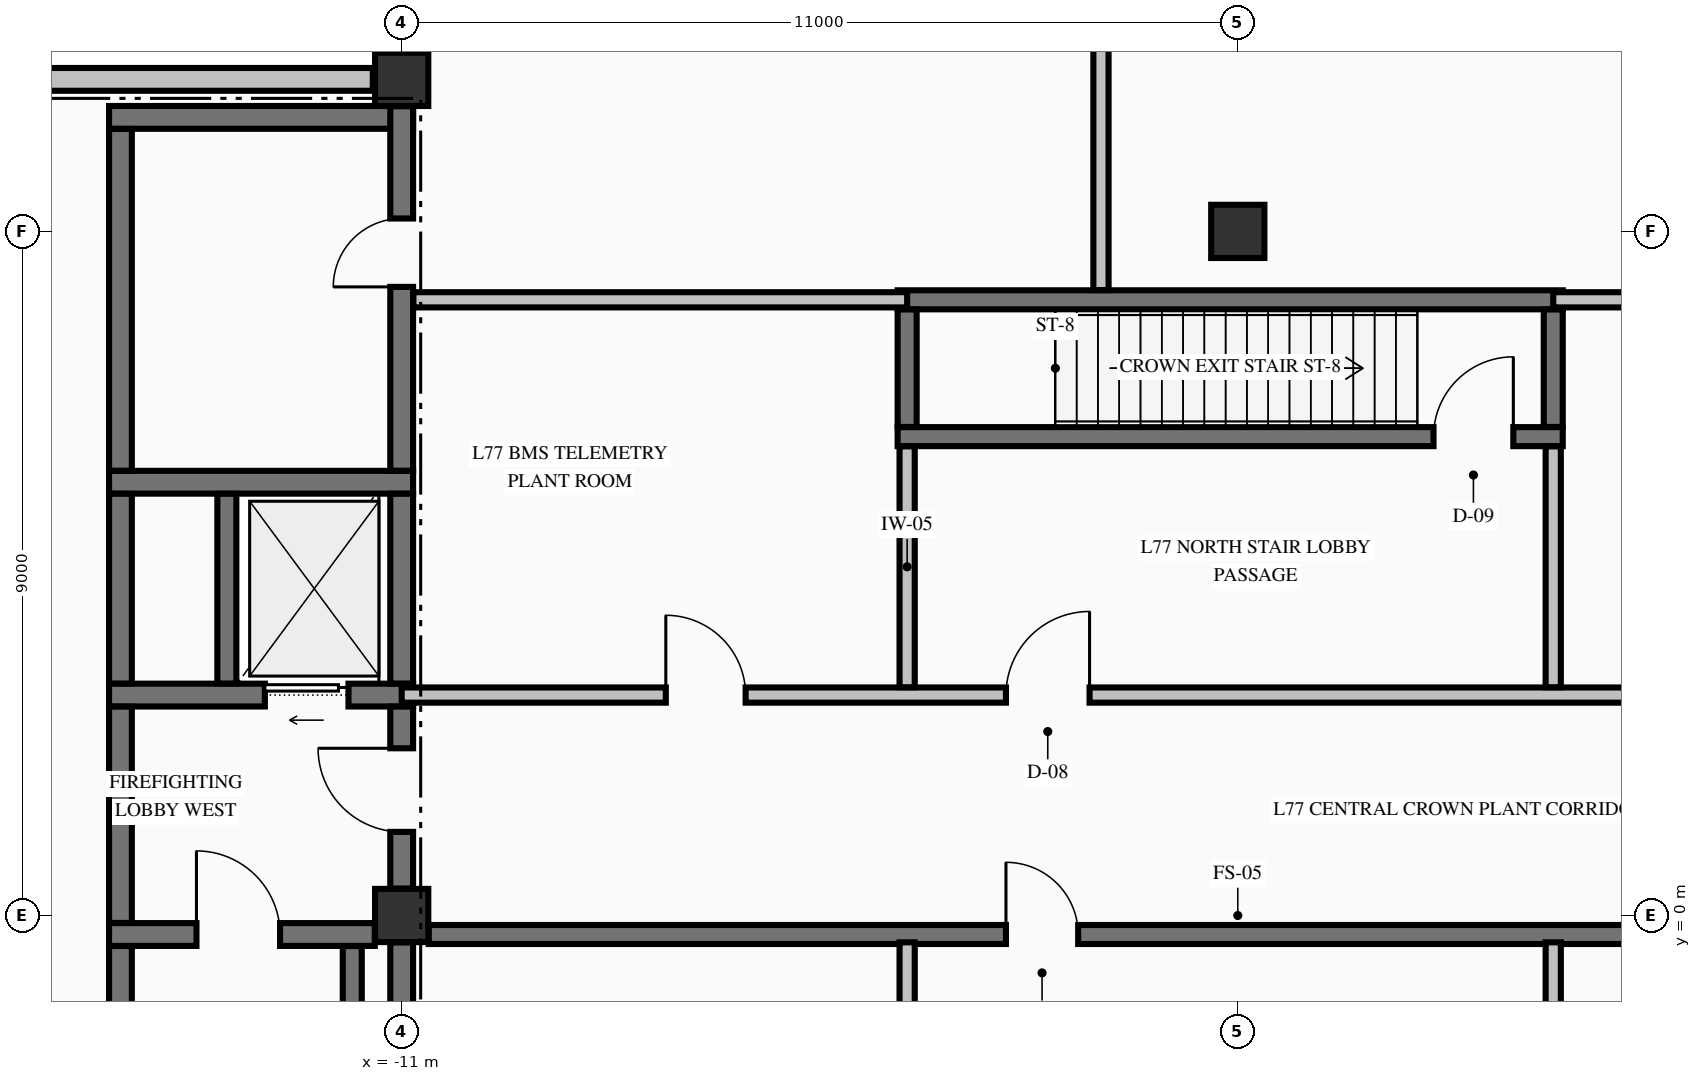
"""IFC4 building model, lengths in metres.
Left out: names, types, materials, properties, quantities, classifications, styles, units other than length and angle.
Written with IfcOpenShell. Run it as: python <this file> out.ifc"""

import sys

from ifc_helpers import new_model, si_unit, direction, frame, frame_2d, origin, origin_2d, place, context, subcontext, project, spatial, rectangle, extrude, element, fill, save


model = new_model("IFC4")
c1 = context("Model", 3, precision=1e-05, world=origin(), true_north=direction((0.0, 1.0)))
c2 = subcontext(c1, "Body", "Model", "MODEL_VIEW")
j1 = project(units=[si_unit("LENGTHUNIT", "METRE"), si_unit("PLANEANGLEUNIT", "RADIAN")], contexts=[c1])
p1 = place(None, origin())
s1 = spatial("IfcSite", under=j1, at=p1, CompositionType="ELEMENT")
p2 = place(p1, origin())
s2 = spatial("IfcBuilding", under=s1, at=p2, CompositionType="ELEMENT")
p3 = place(p2, frame((0.0, 0.0, 287.92)))
s3 = spatial("IfcBuildingStorey", under=s2, at=p3, CompositionType="ELEMENT", Elevation=287.92)
for number, where, z_axis, x_axis in (
    (1, (-11.0, 11.0, -0.325), (0.0, 0.0, 1.0), (1.0, 0.0, 0.0)),
    (2, (-11.0, 0.0, -0.325), (0.0, 0.0, 1.0), (1.0, 0.0, 0.0)),
    (3, (0.0, 9.0, -0.325), (0.0, 0.0, 1.0), (1.0, 0.0, 0.0)),
):
    element("IfcColumn", number, at=place(p3, frame(where, z_axis=z_axis, x_axis=x_axis)), inside=s3, PredefinedType="COLUMN", context=c2, shape_type="SweptSolid", body=[
        extrude(rectangle(XDim=0.7, YDim=0.7, at=origin_2d()), origin(), (0.0, 0.0, 1.0), 3.06),
    ])
p4 = place(p3, frame((-11.38, 11.0, 0.0), z_axis=(0.0, 0.0, 1.0), x_axis=(-1.0, 0.0, 0.0)))
e4 = element("IfcWall", 4, at=p4, inside=s3, PredefinedType="STANDARD", context=c2, shape_type="SweptSolid", body=[
    extrude(rectangle(XDim=5.24, YDim=0.3, at=frame_2d((2.62, 0.0))), origin(), (0.0, 0.0, 1.0), 1.077),
])
p5 = place(p3, frame((-14.85, -0.25, 0.0), z_axis=(0.0, 0.0, 1.0), x_axis=(1.0, 0.0, 0.0)))
e5 = element("IfcWall", 5, at=p5, inside=s3, PredefinedType="SHEAR", context=c2, shape_type="SweptSolid", body=[
    extrude(rectangle(XDim=3.496, YDim=0.3, at=frame_2d((1.748, 0.0))), origin(), (0.0, 0.0, 1.0), 2.735),
])
p6 = place(p5, frame((1.15, 0.0, 0.0)))
e6 = element("IfcOpeningElement", 6, at=p6, cuts=e5, PredefinedType="OPENING", context=c2, shape_type="SweptSolid", body=[
    extrude(rectangle(XDim=1.1, YDim=2.15, at=frame_2d((0.55, 1.075))), frame((0.0, 0.16, 0.0), z_axis=(0.0, -1.0, 0.0), x_axis=(1.0, 0.0, 0.0)), (0.0, 0.0, 1.0), 0.32),
])
p7 = place(p3, frame((-14.85, 2.9, 0.0), z_axis=(0.0, 0.0, 1.0), x_axis=(1.0, 0.0, 0.0)))
e7 = element("IfcWall", 7, at=p7, inside=s3, PredefinedType="SHEAR", context=c2, shape_type="SweptSolid", body=[
    extrude(rectangle(XDim=4.0, YDim=0.3, at=frame_2d((2.0, 0.0))), origin(), (0.0, 0.0, 1.0), 2.735),
])
p8 = place(p7, frame((2.05, 0.0, 0.0)))
e8 = element("IfcOpeningElement", 8, at=p8, cuts=e7, PredefinedType="OPENING", context=c2, shape_type="SweptSolid", body=[
    extrude(rectangle(XDim=1.1, YDim=2.2, at=frame_2d((0.55, 1.1))), frame((0.0, 0.16, 0.0), z_axis=(0.0, -1.0, 0.0), x_axis=(1.0, 0.0, 0.0)), (0.0, 0.0, 1.0), 0.32),
])
p9 = place(p3, frame((-14.85, 5.7, 0.0), z_axis=(0.0, 0.0, 1.0), x_axis=(1.0, 0.0, 0.0)))
e9 = element("IfcWall", 9, at=p9, inside=s3, PredefinedType="SHEAR", context=c2, shape_type="SweptSolid", body=[
    extrude(rectangle(XDim=4.0, YDim=0.3, at=frame_2d((2.0, 0.0))), origin(), (0.0, 0.0, 1.0), 2.735),
])
p10 = place(p3, frame((-4.475, 6.3, 0.0), z_axis=(0.0, 0.0, 1.0), x_axis=(1.0, 0.0, 0.0)))
e10 = element("IfcWall", 10, at=p10, inside=s3, PredefinedType="SOLIDWALL", context=c2, shape_type="SweptSolid", body=[
    extrude(rectangle(XDim=8.75, YDim=0.25, at=frame_2d((4.375, 0.0))), origin(), (0.0, 0.0, 1.0), 2.735),
])
p11 = place(p10, frame((7.05, 0.0, 0.0)))
e11 = element("IfcOpeningElement", 11, at=p11, cuts=e10, PredefinedType="OPENING", context=c2, shape_type="SweptSolid", body=[
    extrude(rectangle(XDim=1.05, YDim=2.15, at=frame_2d((0.525, 1.075))), frame((0.0, 0.135, 0.0), z_axis=(0.0, -1.0, 0.0), x_axis=(1.0, 0.0, 0.0)), (0.0, 0.0, 1.0), 0.27),
])
p12 = place(p3, frame((-4.475, 8.1, 0.0), z_axis=(0.0, 0.0, 1.0), x_axis=(1.0, 0.0, 0.0)))
e12 = element("IfcWall", 12, at=p12, inside=s3, PredefinedType="SOLIDWALL", context=c2, shape_type="SweptSolid", body=[
    extrude(rectangle(XDim=8.75, YDim=0.25, at=frame_2d((4.375, 0.0))), origin(), (0.0, 0.0, 1.0), 2.735),
])
p13 = place(p3, frame((-14.85, 10.5, 0.0), z_axis=(0.0, 0.0, 1.0), x_axis=(1.0, 0.0, 0.0)))
e13 = element("IfcWall", 13, at=p13, inside=s3, PredefinedType="SHEAR", context=c2, shape_type="SweptSolid", body=[
    extrude(rectangle(XDim=4.0, YDim=0.3, at=frame_2d((2.0, 0.0))), origin(), (0.0, 0.0, 1.0), 2.735),
])
p14 = place(p3, frame((-10.644, -0.25, 0.0), z_axis=(0.0, 0.0, 1.0), x_axis=(1.0, 0.0, 0.0)))
e14 = element("IfcWall", 14, at=p14, inside=s3, PredefinedType="SOLIDWALL", context=c2, shape_type="SweptSolid", body=[
    extrude(rectangle(XDim=21.288, YDim=0.25, at=frame_2d((10.644, 0.0))), origin(), (0.0, 0.0, 1.0), 2.735),
])
p15 = place(p14, frame((7.594, 0.0, 0.0)))
e15 = element("IfcOpeningElement", 15, at=p15, cuts=e14, PredefinedType="OPENING", context=c2, shape_type="SweptSolid", body=[
    extrude(rectangle(XDim=0.95, YDim=2.02, at=frame_2d((0.475, 1.01))), frame((0.0, 0.135, 0.0), z_axis=(0.0, -1.0, 0.0), x_axis=(1.0, 0.0, 0.0)), (0.0, 0.0, 1.0), 0.27),
])
p16 = place(p3, frame((-11.0, 2.9, 0.0), z_axis=(0.0, 0.0, 1.0), x_axis=(1.0, 0.0, 0.0)))
e16 = element("IfcWall", 16, at=p16, inside=s3, PredefinedType="PARTITIONING", context=c2, shape_type="SweptSolid", body=[
    extrude(rectangle(XDim=22.0, YDim=0.2, at=frame_2d((11.0, 0.0))), origin(), (0.0, 0.0, 1.0), 2.735),
])
p17 = place(p16, frame((7.95, 0.0, 0.0)))
e17 = element("IfcOpeningElement", 17, at=p17, cuts=e16, PredefinedType="OPENING", context=c2, shape_type="SweptSolid", body=[
    extrude(rectangle(XDim=1.1, YDim=2.15, at=frame_2d((0.55, 1.075))), frame((0.0, 0.11, 0.0), z_axis=(0.0, -1.0, 0.0), x_axis=(1.0, 0.0, 0.0)), (0.0, 0.0, 1.0), 0.22),
])
p18 = place(p16, frame((17.475, 0.0, 0.0)))
e18 = element("IfcOpeningElement", 18, at=p18, cuts=e16, PredefinedType="OPENING", context=c2, shape_type="SweptSolid", body=[
    extrude(rectangle(XDim=1.05, YDim=2.15, at=frame_2d((0.525, 1.075))), frame((0.0, 0.11, 0.0), z_axis=(0.0, -1.0, 0.0), x_axis=(1.0, 0.0, 0.0)), (0.0, 0.0, 1.0), 0.22),
])
p19 = place(p16, frame((3.475, 0.0, 0.0)))
e19 = element("IfcOpeningElement", 19, at=p19, cuts=e16, PredefinedType="OPENING", context=c2, shape_type="SweptSolid", body=[
    extrude(rectangle(XDim=1.05, YDim=2.15, at=frame_2d((0.525, 1.075))), frame((0.0, 0.11, 0.0), z_axis=(0.0, -1.0, 0.0), x_axis=(1.0, 0.0, 0.0)), (0.0, 0.0, 1.0), 0.22),
])
p20 = place(p3, frame((-10.847, 8.1, 0.0), z_axis=(0.0, 0.0, 1.0), x_axis=(1.0, 0.0, 0.0)))
e20 = element("IfcWall", 20, at=p20, inside=s3, PredefinedType="PARTITIONING", context=c2, shape_type="SweptSolid", body=[
    extrude(rectangle(XDim=6.497, YDim=0.2, at=frame_2d((3.249, 0.0))), origin(), (0.0, 0.0, 1.0), 2.735),
])
p21 = place(p3, frame((4.15, 8.1, 0.0), z_axis=(0.0, 0.0, 1.0), x_axis=(1.0, 0.0, 0.0)))
e21 = element("IfcWall", 21, at=p21, inside=s3, PredefinedType="PARTITIONING", context=c2, shape_type="SweptSolid", body=[
    extrude(rectangle(XDim=6.697, YDim=0.2, at=frame_2d((3.349, 0.0))), origin(), (0.0, 0.0, 1.0), 2.735),
])
p22 = place(p21, frame((2.125, 0.0, 0.0)))
e22 = element("IfcOpeningElement", 22, at=p22, cuts=e21, PredefinedType="OPENING", context=c2, shape_type="SweptSolid", body=[
    extrude(rectangle(XDim=1.05, YDim=2.15, at=frame_2d((0.525, 1.075))), frame((0.0, 0.11, 0.0), z_axis=(0.0, -1.0, 0.0), x_axis=(1.0, 0.0, 0.0)), (0.0, 0.0, 1.0), 0.22),
])
p23 = place(p3, frame((-14.7, -9.798, 0.0), z_axis=(0.0, 0.0, 1.0), x_axis=(0.0, 1.0, 0.0)))
e23 = element("IfcWall", 23, at=p23, inside=s3, PredefinedType="SHEAR", context=c2, shape_type="SweptSolid", body=[
    extrude(rectangle(XDim=9.396, YDim=0.3, at=frame_2d((4.698, 0.0))), origin(), (0.0, 0.0, 1.0), 2.735),
])
p24 = place(p3, frame((-14.7, -0.098, 0.0), z_axis=(0.0, 0.0, 1.0), x_axis=(0.0, 1.0, 0.0)))
e24 = element("IfcWall", 24, at=p24, inside=s3, PredefinedType="SHEAR", context=c2, shape_type="SweptSolid", body=[
    extrude(rectangle(XDim=2.846, YDim=0.3, at=frame_2d((1.423, 0.0))), origin(), (0.0, 0.0, 1.0), 2.735),
])
p25 = place(p3, frame((-14.7, 3.052, 0.0), z_axis=(0.0, 0.0, 1.0), x_axis=(0.0, 1.0, 0.0)))
e25 = element("IfcWall", 25, at=p25, inside=s3, PredefinedType="SHEAR", context=c2, shape_type="SweptSolid", body=[
    extrude(rectangle(XDim=2.496, YDim=0.3, at=frame_2d((1.248, 0.0))), origin(), (0.0, 0.0, 1.0), 2.735),
])
p26 = place(p3, frame((-14.7, 5.852, 0.0), z_axis=(0.0, 0.0, 1.0), x_axis=(0.0, 1.0, 0.0)))
e26 = element("IfcWall", 26, at=p26, inside=s3, PredefinedType="SHEAR", context=c2, shape_type="SweptSolid", body=[
    extrude(rectangle(XDim=4.496, YDim=0.3, at=frame_2d((2.248, 0.0))), origin(), (0.0, 0.0, 1.0), 2.735),
])
p27 = place(p3, frame((-13.3, 3.052, 0.0), z_axis=(0.0, 0.0, 1.0), x_axis=(0.0, 1.0, 0.0)))
e27 = element("IfcWall", 27, at=p27, inside=s3, PredefinedType="SOLIDWALL", context=c2, shape_type="SweptSolid", body=[
    extrude(rectangle(XDim=2.496, YDim=0.25, at=frame_2d((1.248, 0.0))), origin(), (0.0, 0.0, 1.0), 2.735),
])
p28 = place(p3, frame((-11.65, -9.798, 0.0), z_axis=(0.0, 0.0, 1.0), x_axis=(0.0, 1.0, 0.0)))
e28 = element("IfcWall", 28, at=p28, inside=s3, PredefinedType="SOLIDWALL", context=c2, shape_type="SweptSolid", body=[
    extrude(rectangle(XDim=9.396, YDim=0.25, at=frame_2d((4.698, 0.0))), origin(), (0.0, 0.0, 1.0), 2.735),
])
p29 = place(p3, frame((-11.0, -9.798, 0.0), z_axis=(0.0, 0.0, 1.0), x_axis=(0.0, 1.0, 0.0)))
e29 = element("IfcWall", 29, at=p29, inside=s3, PredefinedType="SHEAR", context=c2, shape_type="SweptSolid", body=[
    extrude(rectangle(XDim=9.444, YDim=0.3, at=frame_2d((4.722, 0.0))), origin(), (0.0, 0.0, 1.0), 2.735),
])
p30 = place(p3, frame((-11.0, 0.354, 0.0), z_axis=(0.0, 0.0, 1.0), x_axis=(0.0, 1.0, 0.0)))
e30 = element("IfcWall", 30, at=p30, inside=s3, PredefinedType="SHEAR", context=c2, shape_type="SweptSolid", body=[
    extrude(rectangle(XDim=2.394, YDim=0.3, at=frame_2d((1.197, 0.0))), origin(), (0.0, 0.0, 1.0), 2.735),
])
p31 = place(p30, frame((0.746, 0.0, 0.0)))
e31 = element("IfcOpeningElement", 31, at=p31, cuts=e30, PredefinedType="OPENING", context=c2, shape_type="SweptSolid", body=[
    extrude(rectangle(XDim=1.1, YDim=2.15, at=frame_2d((0.55, 1.075))), frame((0.0, 0.16, 0.0), z_axis=(0.0, -1.0, 0.0), x_axis=(1.0, 0.0, 0.0)), (0.0, 0.0, 1.0), 0.32),
])
p32 = place(p3, frame((-11.0, 3.052, 0.0), z_axis=(0.0, 0.0, 1.0), x_axis=(0.0, 1.0, 0.0)))
e32 = element("IfcWall", 32, at=p32, inside=s3, PredefinedType="SHEAR", context=c2, shape_type="SweptSolid", body=[
    extrude(rectangle(XDim=2.496, YDim=0.3, at=frame_2d((1.248, 0.0))), origin(), (0.0, 0.0, 1.0), 2.735),
])
p33 = place(p3, frame((-11.0, 5.852, 0.0), z_axis=(0.0, 0.0, 1.0), x_axis=(0.0, 1.0, 0.0)))
e33 = element("IfcWall", 33, at=p33, inside=s3, PredefinedType="SHEAR", context=c2, shape_type="SweptSolid", body=[
    extrude(rectangle(XDim=4.794, YDim=0.3, at=frame_2d((2.397, 0.0))), origin(), (0.0, 0.0, 1.0), 2.735),
])
p34 = place(p33, frame((2.418, 0.0, 0.0)))
e34 = element("IfcOpeningElement", 34, at=p34, cuts=e33, PredefinedType="OPENING", context=c2, shape_type="SweptSolid", body=[
    extrude(rectangle(XDim=0.9, YDim=2.15, at=frame_2d((0.45, 1.075))), frame((0.0, 0.16, 0.0), z_axis=(0.0, -1.0, 0.0), x_axis=(1.0, 0.0, 0.0)), (0.0, 0.0, 1.0), 0.32),
])
for number, where, z_axis, x_axis in (
    (35, (-4.35, 6.427, 0.0), (0.0, 0.0, 1.0), (0.0, 1.0, 0.0)),
    (36, (4.15, 6.427, 0.0), (0.0, 0.0, 1.0), (0.0, 1.0, 0.0)),
):
    element("IfcWall", number, at=place(p3, frame(where, z_axis=z_axis, x_axis=x_axis)), inside=s3, PredefinedType="SOLIDWALL", context=c2, shape_type="SweptSolid", body=[
        extrude(rectangle(XDim=1.546, YDim=0.25, at=frame_2d((0.773, 0.0))), origin(), (0.0, 0.0, 1.0), 2.735),
    ])
p35 = place(p3, frame((-4.35, -6.172, 0.0), z_axis=(0.0, 0.0, 1.0), x_axis=(0.0, 1.0, 0.0)))
e37 = element("IfcWall", 37, at=p35, inside=s3, PredefinedType="PARTITIONING", context=c2, shape_type="SweptSolid", body=[
    extrude(rectangle(XDim=5.819, YDim=0.2, at=frame_2d((2.91, 0.0))), origin(), (0.0, 0.0, 1.0), 2.735),
])
p36 = place(p35, frame((2.447, 0.0, 0.0)))
e38 = element("IfcOpeningElement", 38, at=p36, cuts=e37, PredefinedType="OPENING", context=c2, shape_type="SweptSolid", body=[
    extrude(rectangle(XDim=1.05, YDim=2.15, at=frame_2d((0.525, 1.075))), frame((0.0, 0.11, 0.0), z_axis=(0.0, -1.0, 0.0), x_axis=(1.0, 0.0, 0.0)), (0.0, 0.0, 1.0), 0.22),
])
p37 = place(p3, frame((-4.35, 3.003, 0.0), z_axis=(0.0, 0.0, 1.0), x_axis=(0.0, 1.0, 0.0)))
e39 = element("IfcWall", 39, at=p37, inside=s3, PredefinedType="PARTITIONING", context=c2, shape_type="SweptSolid", body=[
    extrude(rectangle(XDim=3.169, YDim=0.2, at=frame_2d((1.584, 0.0))), origin(), (0.0, 0.0, 1.0), 2.735),
])
p38 = place(p3, frame((-1.8, 8.228, 0.0), z_axis=(0.0, 0.0, 1.0), x_axis=(0.0, 1.0, 0.0)))
e40 = element("IfcWall", 40, at=p38, inside=s3, PredefinedType="PARTITIONING", context=c2, shape_type="SweptSolid", body=[
    extrude(rectangle(XDim=8.607, YDim=0.2, at=frame_2d((4.303, 0.0))), origin(), (0.0, 0.0, 1.0), 2.735),
])
p39 = place(p38, frame((3.847, 0.0, 0.0)))
e41 = element("IfcOpeningElement", 41, at=p39, cuts=e40, PredefinedType="OPENING", context=c2, shape_type="SweptSolid", body=[
    extrude(rectangle(XDim=0.95, YDim=2.15, at=frame_2d((0.475, 1.075))), frame((0.0, 0.11, 0.0), z_axis=(0.0, -1.0, 0.0), x_axis=(1.0, 0.0, 0.0)), (0.0, 0.0, 1.0), 0.22),
])
p40 = place(p3, frame((4.15, -6.172, 0.0), z_axis=(0.0, 0.0, 1.0), x_axis=(0.0, 1.0, 0.0)))
e42 = element("IfcWall", 42, at=p40, inside=s3, PredefinedType="PARTITIONING", context=c2, shape_type="SweptSolid", body=[
    extrude(rectangle(XDim=5.819, YDim=0.2, at=frame_2d((2.91, 0.0))), origin(), (0.0, 0.0, 1.0), 2.735),
])
p41 = place(p40, frame((2.447, 0.0, 0.0)))
e43 = element("IfcOpeningElement", 43, at=p41, cuts=e42, PredefinedType="OPENING", context=c2, shape_type="SweptSolid", body=[
    extrude(rectangle(XDim=1.05, YDim=2.15, at=frame_2d((0.525, 1.075))), frame((0.0, 0.11, 0.0), z_axis=(0.0, -1.0, 0.0), x_axis=(1.0, 0.0, 0.0)), (0.0, 0.0, 1.0), 0.22),
])
p42 = place(p3, frame((4.15, 3.003, 0.0), z_axis=(0.0, 0.0, 1.0), x_axis=(0.0, 1.0, 0.0)))
e44 = element("IfcWall", 44, at=p42, inside=s3, PredefinedType="PARTITIONING", context=c2, shape_type="SweptSolid", body=[
    extrude(rectangle(XDim=3.169, YDim=0.2, at=frame_2d((1.584, 0.0))), origin(), (0.0, 0.0, 1.0), 2.735),
])
p43 = place(p6, origin())
e45 = element("IfcDoor", 45, at=p43, inside=s3, OperationType="SINGLE_SWING_LEFT", PredefinedType="DOOR", context=c2, shape_type="SweptSolid", body=[
    extrude(rectangle(XDim=1.1, YDim=2.15, at=frame_2d((0.55, 1.075))), frame((0.0, 0.025, 0.0), z_axis=(0.0, -1.0, 0.0), x_axis=(1.0, 0.0, 0.0)), (0.0, 0.0, 1.0), 0.05),
])
fill(e6, e45)
p44 = place(p31, origin())
e46 = element("IfcDoor", 46, at=p44, inside=s3, OperationType="SINGLE_SWING_RIGHT", PredefinedType="DOOR", context=c2, shape_type="SweptSolid", body=[
    extrude(rectangle(XDim=1.1, YDim=2.15, at=frame_2d((0.55, 1.075))), frame((0.0, 0.025, 0.0), z_axis=(0.0, -1.0, 0.0), x_axis=(1.0, 0.0, 0.0)), (0.0, 0.0, 1.0), 0.05),
])
fill(e31, e46)
p45 = place(p8, origin())
e47 = element("IfcDoor", 47, at=p45, inside=s3, OperationType="SLIDING_TO_LEFT", PredefinedType="DOOR", context=c2, shape_type="SweptSolid", body=[
    extrude(rectangle(XDim=1.1, YDim=2.2, at=frame_2d((0.55, 1.1))), frame((0.0, 0.025, 0.0), z_axis=(0.0, -1.0, 0.0), x_axis=(1.0, 0.0, 0.0)), (0.0, 0.0, 1.0), 0.05),
])
fill(e8, e47)
p46 = place(p34, origin())
e48 = element("IfcDoor", 48, at=p46, inside=s3, OperationType="SINGLE_SWING_LEFT", PredefinedType="DOOR", context=c2, shape_type="SweptSolid", body=[
    extrude(rectangle(XDim=0.9, YDim=2.15, at=frame_2d((0.45, 1.075))), frame((0.0, 0.025, 0.0), z_axis=(0.0, -1.0, 0.0), x_axis=(1.0, 0.0, 0.0)), (0.0, 0.0, 1.0), 0.05),
])
fill(e34, e48)
p47 = place(p11, origin())
e49 = element("IfcDoor", 49, at=p47, inside=s3, OperationType="SINGLE_SWING_RIGHT", PredefinedType="DOOR", context=c2, shape_type="SweptSolid", body=[
    extrude(rectangle(XDim=1.05, YDim=2.15, at=frame_2d((0.525, 1.075))), frame((0.0, 0.025, 0.0), z_axis=(0.0, -1.0, 0.0), x_axis=(1.0, 0.0, 0.0)), (0.0, 0.0, 1.0), 0.05),
])
fill(e11, e49)
p48 = place(p15, origin())
e50 = element("IfcDoor", 50, at=p48, inside=s3, OperationType="SINGLE_SWING_LEFT", PredefinedType="DOOR", context=c2, shape_type="SweptSolid", body=[
    extrude(rectangle(XDim=0.95, YDim=2.02, at=frame_2d((0.475, 1.01))), frame((0.0, 0.025, 0.0), z_axis=(0.0, -1.0, 0.0), x_axis=(1.0, 0.0, 0.0)), (0.0, 0.0, 1.0), 0.05),
])
fill(e15, e50)
p49 = place(p17, origin())
e51 = element("IfcDoor", 51, at=p49, inside=s3, OperationType="SINGLE_SWING_RIGHT", PredefinedType="DOOR", context=c2, shape_type="SweptSolid", body=[
    extrude(rectangle(XDim=1.1, YDim=2.15, at=frame_2d((0.55, 1.075))), frame((0.0, 0.025, 0.0), z_axis=(0.0, -1.0, 0.0), x_axis=(1.0, 0.0, 0.0)), (0.0, 0.0, 1.0), 0.05),
])
fill(e17, e51)
p50 = place(p19, origin())
e52 = element("IfcDoor", 52, at=p50, inside=s3, OperationType="SINGLE_SWING_LEFT", PredefinedType="DOOR", context=c2, shape_type="SweptSolid", body=[
    extrude(rectangle(XDim=1.05, YDim=2.15, at=frame_2d((0.525, 1.075))), frame((0.0, 0.025, 0.0), z_axis=(0.0, -1.0, 0.0), x_axis=(1.0, 0.0, 0.0)), (0.0, 0.0, 1.0), 0.05),
])
fill(e19, e52)
save(model, sys.argv[1])
